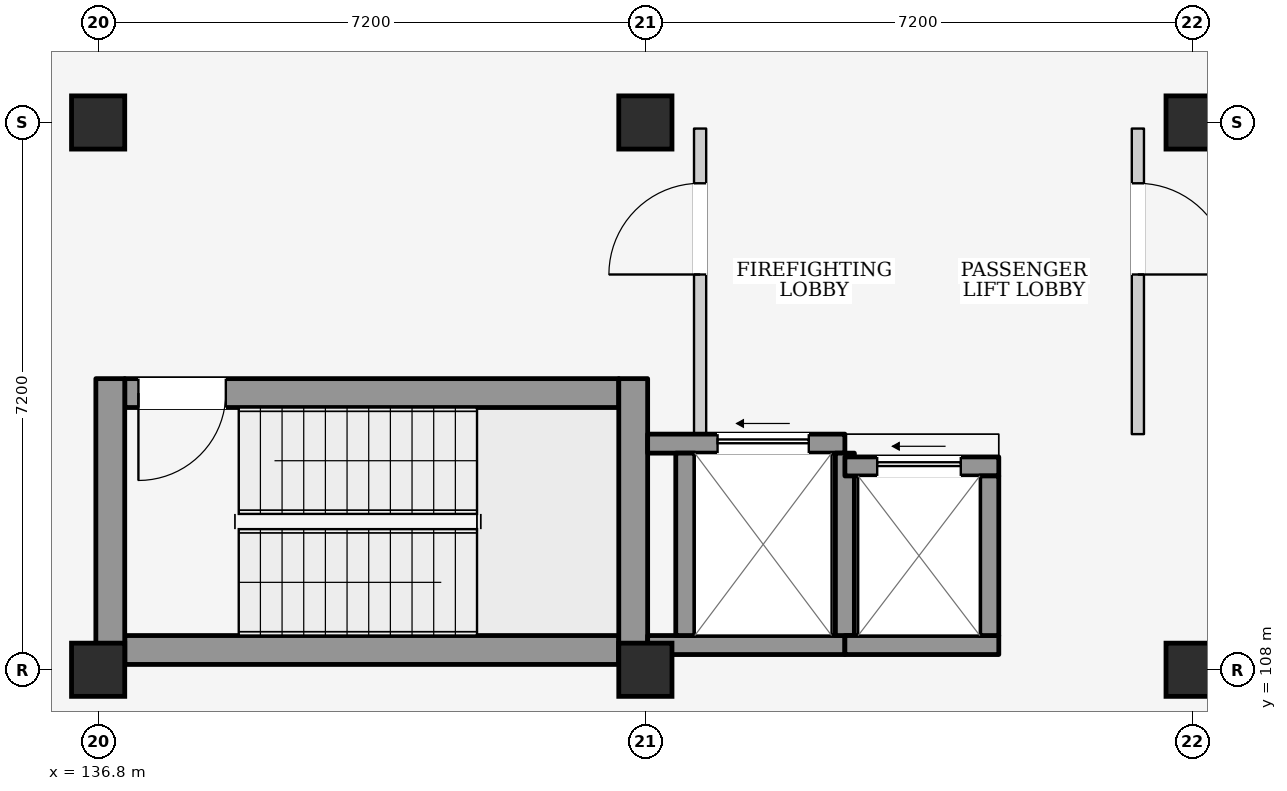
"""IFC4 building model, lengths in metres.
Left out: names, types, materials, properties, quantities, classifications, styles, units other than length and angle.
Written with IfcOpenShell. Run it as: python <this file> out.ifc"""

import sys

from ifc_helpers import new_model, si_unit, direction, frame, frame_2d, origin, origin_2d, place, context, subcontext, project, spatial, rectangle, extrude, element, fill, save


model = new_model("IFC4")
c1 = context("Model", 3, precision=1e-05, world=origin(), true_north=direction((0.0, 1.0)))
c2 = subcontext(c1, "Body", "Model", "MODEL_VIEW")
j1 = project(units=[si_unit("LENGTHUNIT", "METRE"), si_unit("PLANEANGLEUNIT", "RADIAN")], contexts=[c1])
p1 = place(None, origin())
s1 = spatial("IfcSite", under=j1, at=p1, CompositionType="ELEMENT")
p2 = place(p1, origin())
s2 = spatial("IfcBuilding", under=s1, at=p2, CompositionType="ELEMENT")
p3 = place(p2, frame((0.0, 0.0, -4.2)))
s3 = spatial("IfcBuildingStorey", under=s2, at=p3, CompositionType="ELEMENT", Elevation=-4.2)
for number, where, z_axis, x_axis in (
    (1, (136.8, 108.0, 0.0), (0.0, 0.0, 1.0), (1.0, 0.0, 0.0)),
    (2, (136.8, 115.2, 0.0), (0.0, 0.0, 1.0), (1.0, 0.0, 0.0)),
    (3, (144.0, 108.0, 0.0), (0.0, 0.0, 1.0), (1.0, 0.0, 0.0)),
    (4, (144.0, 115.2, 0.0), (0.0, 0.0, 1.0), (1.0, 0.0, 0.0)),
    (5, (151.2, 108.0, 0.0), (0.0, 0.0, 1.0), (1.0, 0.0, 0.0)),
    (6, (151.2, 115.2, 0.0), (0.0, 0.0, 1.0), (1.0, 0.0, 0.0)),
):
    element("IfcColumn", number, at=place(p3, frame(where, z_axis=z_axis, x_axis=x_axis)), inside=s3, PredefinedType="COLUMN", context=c2, shape_type="SweptSolid", body=[
        extrude(rectangle(XDim=0.7, YDim=0.7, at=origin_2d()), origin(), (0.0, 0.0, 1.0), 4.2),
    ])
p4 = place(p3, frame((137.15, 108.26, 0.0), z_axis=(0.0, 0.0, 1.0), x_axis=(1.0, 0.0, 0.0)))
e7 = element("IfcWall", 7, at=p4, inside=s3, PredefinedType="SHEAR", context=c2, shape_type="SweptSolid", body=[
    extrude(rectangle(XDim=6.5, YDim=0.38, at=frame_2d((3.25, 0.0))), origin(), (0.0, 0.0, 1.0), 3.79),
])
p5 = place(p3, frame((137.15, 111.64, 0.0), z_axis=(0.0, 0.0, 1.0), x_axis=(1.0, 0.0, 0.0)))
e8 = element("IfcWall", 8, at=p5, inside=s3, PredefinedType="SHEAR", context=c2, shape_type="SweptSolid", body=[
    extrude(rectangle(XDim=6.5, YDim=0.38, at=frame_2d((3.25, 0.0))), origin(), (0.0, 0.0, 1.0), 3.79),
])
p6 = place(p5, frame((0.18, 0.0, 0.0)))
e9 = element("IfcOpeningElement", 9, at=p6, cuts=e8, PredefinedType="OPENING", context=c2, shape_type="SweptSolid", body=[
    extrude(rectangle(XDim=1.15, YDim=2.2, at=frame_2d((0.575, 1.1))), frame((0.0, 0.205, 0.0), z_axis=(0.0, -1.0, 0.0), x_axis=(1.0, 0.0, 0.0)), (0.0, 0.0, 1.0), 0.41),
])
for number, where, z_axis, x_axis in (
    (10, (136.96, 108.07, 0.0), (0.0, 0.0, 1.0), (0.0, 1.0, 0.0)),
    (11, (143.84, 108.07, 0.0), (0.0, 0.0, 1.0), (0.0, 1.0, 0.0)),
):
    element("IfcWall", number, at=place(p3, frame(where, z_axis=z_axis, x_axis=x_axis)), inside=s3, PredefinedType="SHEAR", context=c2, shape_type="SweptSolid", body=[
        extrude(rectangle(XDim=3.76, YDim=0.38, at=frame_2d((1.88, 0.0))), origin(), (0.0, 0.0, 1.0), 3.79),
    ])
p7 = place(p3, frame((144.72, 111.1, 0.0), z_axis=(0.0, 0.0, 1.0), x_axis=(0.0, 1.0, 0.0)))
e12 = element("IfcWall", 12, at=p7, inside=s3, PredefinedType="PARTITIONING", context=c2, shape_type="SweptSolid", body=[
    extrude(rectangle(XDim=4.02, YDim=0.16, at=frame_2d((2.01, 0.0))), origin(), (0.0, 0.0, 1.0), 3.79),
])
p8 = place(p7, frame((2.1, 0.0, 0.0)))
e13 = element("IfcOpeningElement", 13, at=p8, cuts=e12, PredefinedType="OPENING", context=c2, shape_type="SweptSolid", body=[
    extrude(rectangle(XDim=1.2, YDim=2.2, at=frame_2d((0.6, 1.1))), frame((0.0, 0.095, 0.0), z_axis=(0.0, -1.0, 0.0), x_axis=(1.0, 0.0, 0.0)), (0.0, 0.0, 1.0), 0.19),
])
p9 = place(p3, frame((150.48, 111.1, 0.0), z_axis=(0.0, 0.0, 1.0), x_axis=(0.0, 1.0, 0.0)))
e14 = element("IfcWall", 14, at=p9, inside=s3, PredefinedType="PARTITIONING", context=c2, shape_type="SweptSolid", body=[
    extrude(rectangle(XDim=4.02, YDim=0.16, at=frame_2d((2.01, 0.0))), origin(), (0.0, 0.0, 1.0), 3.79),
])
p10 = place(p9, frame((2.1, 0.0, 0.0)))
e15 = element("IfcOpeningElement", 15, at=p10, cuts=e14, PredefinedType="OPENING", context=c2, shape_type="SweptSolid", body=[
    extrude(rectangle(XDim=1.2, YDim=2.2, at=frame_2d((0.6, 1.1))), frame((0.0, 0.095, 0.0), z_axis=(0.0, -1.0, 0.0), x_axis=(1.0, 0.0, 0.0)), (0.0, 0.0, 1.0), 0.19),
])
p11 = place(p3, frame((144.03, 108.325, 0.0), z_axis=(0.0, 0.0, 1.0), x_axis=(1.0, 0.0, 0.0)))
e16 = element("IfcWall", 16, at=p11, inside=s3, PredefinedType="SHEAR", context=c2, shape_type="SweptSolid", body=[
    extrude(rectangle(XDim=2.595, YDim=0.25, at=frame_2d((1.297, 0.0))), origin(), (0.0, 0.0, 1.0), 3.79),
])
p12 = place(p3, frame((144.03, 110.975, 0.0), z_axis=(0.0, 0.0, 1.0), x_axis=(1.0, 0.0, 0.0)))
e17 = element("IfcWall", 17, at=p12, inside=s3, PredefinedType="SHEAR", context=c2, shape_type="SweptSolid", body=[
    extrude(rectangle(XDim=2.595, YDim=0.25, at=frame_2d((1.297, 0.0))), origin(), (0.0, 0.0, 1.0), 3.79),
])
p13 = place(p12, frame((0.92, 0.0, 0.0)))
e18 = element("IfcOpeningElement", 18, at=p13, cuts=e17, PredefinedType="OPENING", context=c2, shape_type="SweptSolid", body=[
    extrude(rectangle(XDim=1.2, YDim=2.25, at=frame_2d((0.6, 1.125))), frame((0.0, 0.14, 0.0), z_axis=(0.0, -1.0, 0.0), x_axis=(1.0, 0.0, 0.0)), (0.0, 0.0, 1.0), 0.28),
])
for number, where, z_axis, x_axis in (
    (19, (144.525, 108.45, 0.0), (0.0, 0.0, 1.0), (0.0, 1.0, 0.0)),
    (20, (146.625, 108.45, 0.0), (0.0, 0.0, 1.0), (0.0, 1.0, 0.0)),
):
    element("IfcWall", number, at=place(p3, frame(where, z_axis=z_axis, x_axis=x_axis)), inside=s3, PredefinedType="SHEAR", context=c2, shape_type="SweptSolid", body=[
        extrude(rectangle(XDim=2.4, YDim=0.25, at=frame_2d((1.2, 0.0))), origin(), (0.0, 0.0, 1.0), 3.79),
    ])
p14 = place(p3, frame((146.625, 108.325, 0.0), z_axis=(0.0, 0.0, 1.0), x_axis=(1.0, 0.0, 0.0)))
e21 = element("IfcWall", 21, at=p14, inside=s3, PredefinedType="SHEAR", context=c2, shape_type="SweptSolid", body=[
    extrude(rectangle(XDim=2.025, YDim=0.25, at=frame_2d((1.012, 0.0))), origin(), (0.0, 0.0, 1.0), 3.79),
])
p15 = place(p3, frame((146.625, 110.675, 0.0), z_axis=(0.0, 0.0, 1.0), x_axis=(1.0, 0.0, 0.0)))
e22 = element("IfcWall", 22, at=p15, inside=s3, PredefinedType="SHEAR", context=c2, shape_type="SweptSolid", body=[
    extrude(rectangle(XDim=2.025, YDim=0.25, at=frame_2d((1.012, 0.0))), origin(), (0.0, 0.0, 1.0), 3.79),
])
p16 = place(p15, frame((0.425, 0.0, 0.0)))
e23 = element("IfcOpeningElement", 23, at=p16, cuts=e22, PredefinedType="OPENING", context=c2, shape_type="SweptSolid", body=[
    extrude(rectangle(XDim=1.1, YDim=2.15, at=frame_2d((0.55, 1.075))), frame((0.0, 0.14, 0.0), z_axis=(0.0, -1.0, 0.0), x_axis=(1.0, 0.0, 0.0)), (0.0, 0.0, 1.0), 0.28),
])
p17 = place(p3, frame((148.525, 108.45, 0.0), z_axis=(0.0, 0.0, 1.0), x_axis=(0.0, 1.0, 0.0)))
e24 = element("IfcWall", 24, at=p17, inside=s3, PredefinedType="SHEAR", context=c2, shape_type="SweptSolid", body=[
    extrude(rectangle(XDim=2.1, YDim=0.25, at=frame_2d((1.05, 0.0))), origin(), (0.0, 0.0, 1.0), 3.79),
])
p18 = place(p6, frame((1.15, 0.0, 0.0), z_axis=(0.0, 0.0, 1.0), x_axis=(-1.0, 0.0, 0.0)))
e25 = element("IfcDoor", 25, at=p18, inside=s3, OperationType="SINGLE_SWING_RIGHT", PredefinedType="DOOR", context=c2, shape_type="SweptSolid", body=[
    extrude(rectangle(XDim=1.15, YDim=2.2, at=frame_2d((0.575, 1.1))), frame((0.0, 0.025, 0.0), z_axis=(0.0, -1.0, 0.0), x_axis=(1.0, 0.0, 0.0)), (0.0, 0.0, 1.0), 0.05),
])
fill(e9, e25)
p19 = place(p8, origin())
e26 = element("IfcDoor", 26, at=p19, inside=s3, OperationType="SINGLE_SWING_LEFT", PredefinedType="DOOR", context=c2, shape_type="SweptSolid", body=[
    extrude(rectangle(XDim=1.2, YDim=2.2, at=frame_2d((0.6, 1.1))), frame((0.0, 0.025, 0.0), z_axis=(0.0, -1.0, 0.0), x_axis=(1.0, 0.0, 0.0)), (0.0, 0.0, 1.0), 0.05),
])
fill(e13, e26)
p20 = place(p10, frame((1.2, 0.0, 0.0), z_axis=(0.0, 0.0, 1.0), x_axis=(-1.0, 0.0, 0.0)))
e27 = element("IfcDoor", 27, at=p20, inside=s3, OperationType="SINGLE_SWING_RIGHT", PredefinedType="DOOR", context=c2, shape_type="SweptSolid", body=[
    extrude(rectangle(XDim=1.2, YDim=2.2, at=frame_2d((0.6, 1.1))), frame((0.0, 0.025, 0.0), z_axis=(0.0, -1.0, 0.0), x_axis=(1.0, 0.0, 0.0)), (0.0, 0.0, 1.0), 0.05),
])
fill(e15, e27)
p21 = place(p13, origin())
e28 = element("IfcDoor", 28, at=p21, inside=s3, OperationType="SLIDING_TO_LEFT", PredefinedType="DOOR", context=c2, shape_type="SweptSolid", body=[
    extrude(rectangle(XDim=1.2, YDim=2.25, at=frame_2d((0.6, 1.125))), frame((0.0, 0.025, 0.0), z_axis=(0.0, -1.0, 0.0), x_axis=(1.0, 0.0, 0.0)), (0.0, 0.0, 1.0), 0.05),
])
fill(e18, e28)
p22 = place(p16, origin())
e29 = element("IfcDoor", 29, at=p22, inside=s3, OperationType="SLIDING_TO_LEFT", PredefinedType="DOOR", context=c2, shape_type="SweptSolid", body=[
    extrude(rectangle(XDim=1.1, YDim=2.15, at=frame_2d((0.55, 1.075))), frame((0.0, 0.025, 0.0), z_axis=(0.0, -1.0, 0.0), x_axis=(1.0, 0.0, 0.0)), (0.0, 0.0, 1.0), 0.05),
])
fill(e23, e29)
save(model, sys.argv[1])
